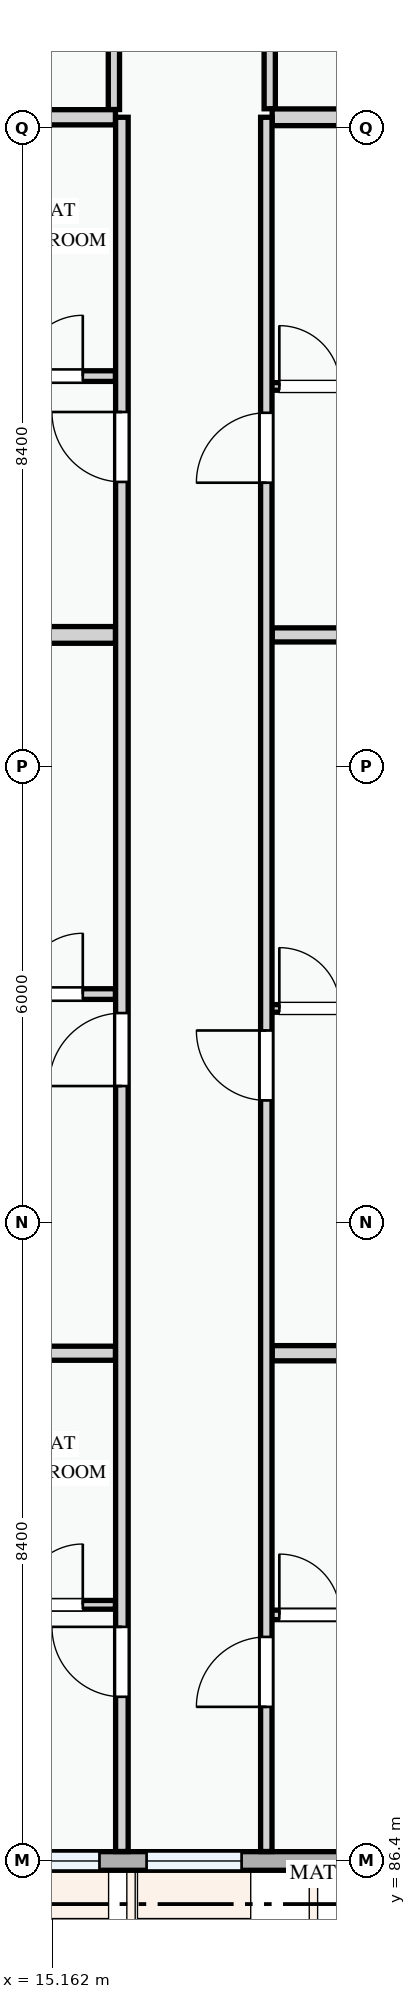
"""IFC4 building model, lengths in metres.
Left out: names, types, materials, properties, quantities, classifications, styles, units other than length and angle.
Written with IfcOpenShell. Run it as: python <this file> out.ifc"""

import sys

from ifc_helpers import new_model, si_unit, direction, frame, frame_2d, origin, place, context, subcontext, project, spatial, rectangle, extrude, element, fill, save


model = new_model("IFC4")
c1 = context("Model", 3, precision=1e-05, world=origin(), true_north=direction((0.0, 1.0)))
c2 = subcontext(c1, "Body", "Model", "MODEL_VIEW")
j1 = project(units=[si_unit("LENGTHUNIT", "METRE"), si_unit("PLANEANGLEUNIT", "RADIAN")], contexts=[c1])
p1 = place(None, origin())
s1 = spatial("IfcSite", under=j1, at=p1, CompositionType="ELEMENT")
p2 = place(p1, origin())
s2 = spatial("IfcBuilding", under=s1, at=p2, CompositionType="ELEMENT")
p3 = place(p2, frame((0.0, 0.0, 41.1)))
s3 = spatial("IfcBuildingStorey", under=s2, at=p3, CompositionType="ELEMENT", Elevation=41.1)
p4 = place(p3, frame((14.4, 86.4, 0.0), z_axis=(0.0, 0.0, 1.0), x_axis=(1.0, 0.0, 0.0)))
e1 = element("IfcWall", 1, at=p4, inside=s3, PredefinedType="STANDARD", context=c2, shape_type="SweptSolid", body=[
    extrude(rectangle(XDim=8.4, YDim=0.245, at=frame_2d((4.2, 0.0))), origin(), (0.0, 0.0, 1.0), 2.375),
])
p5 = place(p4, frame((0.485, 0.0, 0.78)))
e2 = element("IfcOpeningElement", 2, at=p5, cuts=e1, PredefinedType="OPENING", context=c2, shape_type="SweptSolid", body=[
    extrude(rectangle(XDim=0.9, YDim=1.2, at=frame_2d((0.45, 0.6))), frame((0.0, 0.133, 0.0), z_axis=(0.0, -1.0, 0.0), x_axis=(1.0, 0.0, 0.0)), (0.0, 0.0, 1.0), 0.265),
])
p6 = place(p4, frame((2.005, 0.0, 0.78)))
e3 = element("IfcOpeningElement", 3, at=p6, cuts=e1, PredefinedType="OPENING", context=c2, shape_type="SweptSolid", body=[
    extrude(rectangle(XDim=1.25, YDim=1.3, at=frame_2d((0.625, 0.65))), frame((0.0, 0.133, 0.0), z_axis=(0.0, -1.0, 0.0), x_axis=(1.0, 0.0, 0.0)), (0.0, 0.0, 1.0), 0.265),
])
p7 = place(p4, frame((4.985, 0.0, 0.78)))
e4 = element("IfcOpeningElement", 4, at=p7, cuts=e1, PredefinedType="OPENING", context=c2, shape_type="SweptSolid", body=[
    extrude(rectangle(XDim=1.82, YDim=1.46, at=frame_2d((0.91, 0.73))), frame((0.0, 0.133, 0.0), z_axis=(0.0, -1.0, 0.0), x_axis=(1.0, 0.0, 0.0)), (0.0, 0.0, 1.0), 0.265),
])
p8 = place(p3, frame((15.975, 113.324, 0.0), z_axis=(0.0, 0.0, 1.0), x_axis=(0.0, -1.0, 0.0)))
e5 = element("IfcWall", 5, at=p8, inside=s3, PredefinedType="PARTITIONING", context=c2, shape_type="SweptSolid", body=[
    extrude(rectangle(XDim=3.882, YDim=0.148, at=frame_2d((1.941, 0.0))), origin(), (0.0, 0.0, 1.0), 3.0),
])
p9 = place(p3, frame((18.025, 113.324, 0.0), z_axis=(0.0, 0.0, 1.0), x_axis=(0.0, -1.0, 0.0)))
e6 = element("IfcWall", 6, at=p9, inside=s3, PredefinedType="PARTITIONING", context=c2, shape_type="SweptSolid", body=[
    extrude(rectangle(XDim=3.872, YDim=0.148, at=frame_2d((1.936, 0.0))), origin(), (0.0, 0.0, 1.0), 3.0),
])
p10 = place(p3, frame((8.524, 89.77, 0.0), z_axis=(0.0, 0.0, 1.0), x_axis=(1.0, 0.0, 0.0)))
e7 = element("IfcWall", 7, at=p10, inside=s3, PredefinedType="PARTITIONING", context=c2, shape_type="SweptSolid", body=[
    extrude(rectangle(XDim=7.471, YDim=0.115, at=frame_2d((3.736, 0.0))), origin(), (0.0, 0.0, 1.0), 3.0),
])
p11 = place(p10, frame((1.339, 0.0, 0.0)))
e8 = element("IfcOpeningElement", 8, at=p11, cuts=e7, PredefinedType="OPENING", context=c2, shape_type="SweptSolid", body=[
    extrude(rectangle(XDim=0.85, YDim=2.1, at=frame_2d((0.425, 1.05))), frame((0.0, 0.067, 0.0), z_axis=(0.0, -1.0, 0.0), x_axis=(1.0, 0.0, 0.0)), (0.0, 0.0, 1.0), 0.135),
])
p12 = place(p10, frame((4.235, 0.0, 0.0)))
e9 = element("IfcOpeningElement", 9, at=p12, cuts=e7, PredefinedType="OPENING", context=c2, shape_type="SweptSolid", body=[
    extrude(rectangle(XDim=0.85, YDim=2.1, at=frame_2d((0.425, 1.05))), frame((0.0, 0.067, 0.0), z_axis=(0.0, -1.0, 0.0), x_axis=(1.0, 0.0, 0.0)), (0.0, 0.0, 1.0), 0.135),
])
p13 = place(p10, frame((6.241, 0.0, 0.0)))
e10 = element("IfcOpeningElement", 10, at=p13, cuts=e7, PredefinedType="OPENING", context=c2, shape_type="SweptSolid", body=[
    extrude(rectangle(XDim=0.8, YDim=2.1, at=frame_2d((0.4, 1.05))), frame((0.0, 0.067, 0.0), z_axis=(0.0, -1.0, 0.0), x_axis=(1.0, 0.0, 0.0)), (0.0, 0.0, 1.0), 0.135),
])
p14 = place(p3, frame((17.98, 89.638, 0.0), z_axis=(0.0, 0.0, 1.0), x_axis=(1.0, 0.0, 0.0)))
e11 = element("IfcWall", 11, at=p14, inside=s3, PredefinedType="PARTITIONING", context=c2, shape_type="SweptSolid", body=[
    extrude(rectangle(XDim=4.696, YDim=0.125, at=frame_2d((2.348, 0.0))), origin(), (0.0, 0.0, 1.0), 3.0),
])
p15 = place(p14, frame((0.171, 0.0, 0.0)))
e12 = element("IfcOpeningElement", 12, at=p15, cuts=e11, PredefinedType="OPENING", context=c2, shape_type="SweptSolid", body=[
    extrude(rectangle(XDim=0.8, YDim=2.1, at=frame_2d((0.4, 1.05))), frame((0.0, 0.073, 0.0), z_axis=(0.0, -1.0, 0.0), x_axis=(1.0, 0.0, 0.0)), (0.0, 0.0, 1.0), 0.145),
])
p16 = place(p14, frame((1.384, 0.0, 0.0)))
e13 = element("IfcOpeningElement", 13, at=p16, cuts=e11, PredefinedType="OPENING", context=c2, shape_type="SweptSolid", body=[
    extrude(rectangle(XDim=0.85, YDim=2.1, at=frame_2d((0.425, 1.05))), frame((0.0, 0.073, 0.0), z_axis=(0.0, -1.0, 0.0), x_axis=(1.0, 0.0, 0.0)), (0.0, 0.0, 1.0), 0.145),
])
p17 = place(p14, frame((3.193, 0.0, 0.0)))
e14 = element("IfcOpeningElement", 14, at=p17, cuts=e11, PredefinedType="OPENING", context=c2, shape_type="SweptSolid", body=[
    extrude(rectangle(XDim=0.85, YDim=2.1, at=frame_2d((0.425, 1.05))), frame((0.0, 0.073, 0.0), z_axis=(0.0, -1.0, 0.0), x_axis=(1.0, 0.0, 0.0)), (0.0, 0.0, 1.0), 0.145),
])
p18 = place(p3, frame((8.524, 97.805, 0.0), z_axis=(0.0, 0.0, 1.0), x_axis=(1.0, 0.0, 0.0)))
e15 = element("IfcWall", 15, at=p18, inside=s3, PredefinedType="PARTITIONING", context=c2, shape_type="SweptSolid", body=[
    extrude(rectangle(XDim=7.471, YDim=0.14, at=frame_2d((3.736, 0.0))), origin(), (0.0, 0.0, 1.0), 3.0),
])
p19 = place(p18, frame((1.339, 0.0, 0.0)))
e16 = element("IfcOpeningElement", 16, at=p19, cuts=e15, PredefinedType="OPENING", context=c2, shape_type="SweptSolid", body=[
    extrude(rectangle(XDim=0.85, YDim=2.1, at=frame_2d((0.425, 1.05))), frame((0.0, 0.08, 0.0), z_axis=(0.0, -1.0, 0.0), x_axis=(1.0, 0.0, 0.0)), (0.0, 0.0, 1.0), 0.16),
])
p20 = place(p18, frame((4.235, 0.0, 0.0)))
e17 = element("IfcOpeningElement", 17, at=p20, cuts=e15, PredefinedType="OPENING", context=c2, shape_type="SweptSolid", body=[
    extrude(rectangle(XDim=0.82, YDim=2.08, at=frame_2d((0.41, 1.04))), frame((0.0, 0.08, 0.0), z_axis=(0.0, -1.0, 0.0), x_axis=(1.0, 0.0, 0.0)), (0.0, 0.0, 1.0), 0.16),
])
p21 = place(p18, frame((6.241, 0.0, 0.0)))
e18 = element("IfcOpeningElement", 18, at=p21, cuts=e15, PredefinedType="OPENING", context=c2, shape_type="SweptSolid", body=[
    extrude(rectangle(XDim=0.8, YDim=2.1, at=frame_2d((0.4, 1.05))), frame((0.0, 0.08, 0.0), z_axis=(0.0, -1.0, 0.0), x_axis=(1.0, 0.0, 0.0)), (0.0, 0.0, 1.0), 0.16),
])
p22 = place(p3, frame((17.98, 97.616, 0.0), z_axis=(0.0, 0.0, 1.0), x_axis=(1.0, 0.0, 0.0)))
e19 = element("IfcWall", 19, at=p22, inside=s3, PredefinedType="PARTITIONING", context=c2, shape_type="SweptSolid", body=[
    extrude(rectangle(XDim=4.696, YDim=0.1, at=frame_2d((2.348, 0.0))), origin(), (0.0, 0.0, 1.0), 3.0),
])
p23 = place(p22, frame((0.171, 0.0, 0.0)))
e20 = element("IfcOpeningElement", 20, at=p23, cuts=e19, PredefinedType="OPENING", context=c2, shape_type="SweptSolid", body=[
    extrude(rectangle(XDim=0.8, YDim=2.1, at=frame_2d((0.4, 1.05))), frame((0.0, 0.06, 0.0), z_axis=(0.0, -1.0, 0.0), x_axis=(1.0, 0.0, 0.0)), (0.0, 0.0, 1.0), 0.12),
])
p24 = place(p22, frame((1.384, 0.0, 0.0)))
e21 = element("IfcOpeningElement", 21, at=p24, cuts=e19, PredefinedType="OPENING", context=c2, shape_type="SweptSolid", body=[
    extrude(rectangle(XDim=0.85, YDim=2.1, at=frame_2d((0.425, 1.05))), frame((0.0, 0.06, 0.0), z_axis=(0.0, -1.0, 0.0), x_axis=(1.0, 0.0, 0.0)), (0.0, 0.0, 1.0), 0.12),
])
p25 = place(p22, frame((3.193, 0.0, 0.0)))
e22 = element("IfcOpeningElement", 22, at=p25, cuts=e19, PredefinedType="OPENING", context=c2, shape_type="SweptSolid", body=[
    extrude(rectangle(XDim=0.82, YDim=2.08, at=frame_2d((0.41, 1.04))), frame((0.0, 0.06, 0.0), z_axis=(0.0, -1.0, 0.0), x_axis=(1.0, 0.0, 0.0)), (0.0, 0.0, 1.0), 0.12),
])
p26 = place(p3, frame((8.524, 93.08, 0.0), z_axis=(0.0, 0.0, 1.0), x_axis=(1.0, 0.0, 0.0)))
e23 = element("IfcWall", 23, at=p26, inside=s3, PredefinedType="PARTITIONING", context=c2, shape_type="SweptSolid", body=[
    extrude(rectangle(XDim=7.471, YDim=0.185, at=frame_2d((3.736, 0.0))), origin(), (0.0, 0.0, 1.0), 3.0),
])
p27 = place(p3, frame((18.057, 93.08, 0.0), z_axis=(0.0, 0.0, 1.0), x_axis=(1.0, 0.0, 0.0)))
e24 = element("IfcWall", 24, at=p27, inside=s3, PredefinedType="PARTITIONING", context=c2, shape_type="SweptSolid", body=[
    extrude(rectangle(XDim=4.619, YDim=0.2, at=frame_2d((2.309, 0.0))), origin(), (0.0, 0.0, 1.0), 3.0),
])
p28 = place(p3, frame((8.524, 105.935, 0.0), z_axis=(0.0, 0.0, 1.0), x_axis=(1.0, 0.0, 0.0)))
e25 = element("IfcWall", 25, at=p28, inside=s3, PredefinedType="PARTITIONING", context=c2, shape_type="SweptSolid", body=[
    extrude(rectangle(XDim=7.471, YDim=0.14, at=frame_2d((3.736, 0.0))), origin(), (0.0, 0.0, 1.0), 3.0),
])
p29 = place(p28, frame((1.339, 0.0, 0.0)))
e26 = element("IfcOpeningElement", 26, at=p29, cuts=e25, PredefinedType="OPENING", context=c2, shape_type="SweptSolid", body=[
    extrude(rectangle(XDim=0.85, YDim=2.1, at=frame_2d((0.425, 1.05))), frame((0.0, 0.08, 0.0), z_axis=(0.0, -1.0, 0.0), x_axis=(1.0, 0.0, 0.0)), (0.0, 0.0, 1.0), 0.16),
])
p30 = place(p28, frame((4.235, 0.0, 0.0)))
e27 = element("IfcOpeningElement", 27, at=p30, cuts=e25, PredefinedType="OPENING", context=c2, shape_type="SweptSolid", body=[
    extrude(rectangle(XDim=0.85, YDim=2.1, at=frame_2d((0.425, 1.05))), frame((0.0, 0.08, 0.0), z_axis=(0.0, -1.0, 0.0), x_axis=(1.0, 0.0, 0.0)), (0.0, 0.0, 1.0), 0.16),
])
p31 = place(p28, frame((6.241, 0.0, 0.0)))
e28 = element("IfcOpeningElement", 28, at=p31, cuts=e25, PredefinedType="OPENING", context=c2, shape_type="SweptSolid", body=[
    extrude(rectangle(XDim=0.8, YDim=2.1, at=frame_2d((0.4, 1.05))), frame((0.0, 0.08, 0.0), z_axis=(0.0, -1.0, 0.0), x_axis=(1.0, 0.0, 0.0)), (0.0, 0.0, 1.0), 0.16),
])
p32 = place(p3, frame((17.98, 105.799, 0.0), z_axis=(0.0, 0.0, 1.0), x_axis=(1.0, 0.0, 0.0)))
e29 = element("IfcWall", 29, at=p32, inside=s3, PredefinedType="PARTITIONING", context=c2, shape_type="SweptSolid", body=[
    extrude(rectangle(XDim=4.696, YDim=0.1, at=frame_2d((2.348, 0.0))), origin(), (0.0, 0.0, 1.0), 3.0),
])
p33 = place(p32, frame((0.171, 0.0, 0.0)))
e30 = element("IfcOpeningElement", 30, at=p33, cuts=e29, PredefinedType="OPENING", context=c2, shape_type="SweptSolid", body=[
    extrude(rectangle(XDim=0.8, YDim=2.1, at=frame_2d((0.4, 1.05))), frame((0.0, 0.06, 0.0), z_axis=(0.0, -1.0, 0.0), x_axis=(1.0, 0.0, 0.0)), (0.0, 0.0, 1.0), 0.12),
])
p34 = place(p32, frame((1.384, 0.0, 0.0)))
e31 = element("IfcOpeningElement", 31, at=p34, cuts=e29, PredefinedType="OPENING", context=c2, shape_type="SweptSolid", body=[
    extrude(rectangle(XDim=0.85, YDim=2.1, at=frame_2d((0.425, 1.05))), frame((0.0, 0.06, 0.0), z_axis=(0.0, -1.0, 0.0), x_axis=(1.0, 0.0, 0.0)), (0.0, 0.0, 1.0), 0.12),
])
p35 = place(p32, frame((3.193, 0.0, 0.0)))
e32 = element("IfcOpeningElement", 32, at=p35, cuts=e29, PredefinedType="OPENING", context=c2, shape_type="SweptSolid", body=[
    extrude(rectangle(XDim=0.85, YDim=2.1, at=frame_2d((0.425, 1.05))), frame((0.0, 0.06, 0.0), z_axis=(0.0, -1.0, 0.0), x_axis=(1.0, 0.0, 0.0)), (0.0, 0.0, 1.0), 0.12),
])
p36 = place(p3, frame((8.524, 102.53, 0.0), z_axis=(0.0, 0.0, 1.0), x_axis=(1.0, 0.0, 0.0)))
e33 = element("IfcWall", 33, at=p36, inside=s3, PredefinedType="PARTITIONING", context=c2, shape_type="SweptSolid", body=[
    extrude(rectangle(XDim=7.471, YDim=0.22, at=frame_2d((3.736, 0.0))), origin(), (0.0, 0.0, 1.0), 3.0),
])
p37 = place(p3, frame((18.057, 102.53, 0.0), z_axis=(0.0, 0.0, 1.0), x_axis=(1.0, 0.0, 0.0)))
e34 = element("IfcWall", 34, at=p37, inside=s3, PredefinedType="PARTITIONING", context=c2, shape_type="SweptSolid", body=[
    extrude(rectangle(XDim=4.619, YDim=0.185, at=frame_2d((2.309, 0.0))), origin(), (0.0, 0.0, 1.0), 3.0),
])
p38 = place(p3, frame((8.524, 109.34, 0.0), z_axis=(0.0, 0.0, 1.0), x_axis=(1.0, 0.0, 0.0)))
e35 = element("IfcWall", 35, at=p38, inside=s3, PredefinedType="PARTITIONING", context=c2, shape_type="SweptSolid", body=[
    extrude(rectangle(XDim=7.471, YDim=0.2, at=frame_2d((3.736, 0.0))), origin(), (0.0, 0.0, 1.0), 2.375),
])
p39 = place(p3, frame((18.057, 109.34, 0.0), z_axis=(0.0, 0.0, 1.0), x_axis=(1.0, 0.0, 0.0)))
e36 = element("IfcWall", 36, at=p39, inside=s3, PredefinedType="PARTITIONING", context=c2, shape_type="SweptSolid", body=[
    extrude(rectangle(XDim=4.683, YDim=0.22, at=frame_2d((2.342, 0.0))), origin(), (0.0, 0.0, 1.0), 2.375),
])
p40 = place(p3, frame((16.08, 86.524, 0.0), z_axis=(0.0, 0.0, 1.0), x_axis=(0.0, 1.0, 0.0)))
e37 = element("IfcWall", 37, at=p40, inside=s3, PredefinedType="PARTITIONING", context=c2, shape_type="SweptSolid", body=[
    extrude(rectangle(XDim=22.816, YDim=0.165, at=frame_2d((11.408, 0.0))), origin(), (0.0, 0.0, 1.0), 3.0),
])
p41 = place(p40, frame((2.035, 0.0, 0.0)))
e38 = element("IfcOpeningElement", 38, at=p41, cuts=e37, PredefinedType="OPENING", context=c2, shape_type="SweptSolid", body=[
    extrude(rectangle(XDim=0.92, YDim=2.1, at=frame_2d((0.46, 1.05))), frame((0.0, 0.093, 0.0), z_axis=(0.0, -1.0, 0.0), x_axis=(1.0, 0.0, 0.0)), (0.0, 0.0, 1.0), 0.185),
])
p42 = place(p40, frame((10.071, 0.0, 0.0)))
e39 = element("IfcOpeningElement", 39, at=p42, cuts=e37, PredefinedType="OPENING", context=c2, shape_type="SweptSolid", body=[
    extrude(rectangle(XDim=0.96, YDim=2.12, at=frame_2d((0.48, 1.06))), frame((0.0, 0.093, 0.0), z_axis=(0.0, -1.0, 0.0), x_axis=(1.0, 0.0, 0.0)), (0.0, 0.0, 1.0), 0.185),
])
p43 = place(p40, frame((18.018, 0.0, 0.0)))
e40 = element("IfcOpeningElement", 40, at=p43, cuts=e37, PredefinedType="OPENING", context=c2, shape_type="SweptSolid", body=[
    extrude(rectangle(XDim=0.92, YDim=2.1, at=frame_2d((0.46, 1.05))), frame((0.0, 0.093, 0.0), z_axis=(0.0, -1.0, 0.0), x_axis=(1.0, 0.0, 0.0)), (0.0, 0.0, 1.0), 0.185),
])
p44 = place(p3, frame((17.98, 86.524, 0.0), z_axis=(0.0, 0.0, 1.0), x_axis=(0.0, 1.0, 0.0)))
e41 = element("IfcWall", 41, at=p44, inside=s3, PredefinedType="PARTITIONING", context=c2, shape_type="SweptSolid", body=[
    extrude(rectangle(XDim=22.816, YDim=0.15, at=frame_2d((11.408, 0.0))), origin(), (0.0, 0.0, 1.0), 3.0),
])
p45 = place(p44, frame((1.903, 0.0, 0.0)))
e42 = element("IfcOpeningElement", 42, at=p45, cuts=e41, PredefinedType="OPENING", context=c2, shape_type="SweptSolid", body=[
    extrude(rectangle(XDim=0.92, YDim=2.1, at=frame_2d((0.46, 1.05))), frame((0.0, 0.085, 0.0), z_axis=(0.0, -1.0, 0.0), x_axis=(1.0, 0.0, 0.0)), (0.0, 0.0, 1.0), 0.17),
])
p46 = place(p44, frame((9.882, 0.0, 0.0)))
e43 = element("IfcOpeningElement", 43, at=p46, cuts=e41, PredefinedType="OPENING", context=c2, shape_type="SweptSolid", body=[
    extrude(rectangle(XDim=0.92, YDim=2.1, at=frame_2d((0.46, 1.05))), frame((0.0, 0.085, 0.0), z_axis=(0.0, -1.0, 0.0), x_axis=(1.0, 0.0, 0.0)), (0.0, 0.0, 1.0), 0.17),
])
p47 = place(p44, frame((18.008, 0.0, 0.0)))
e44 = element("IfcOpeningElement", 44, at=p47, cuts=e41, PredefinedType="OPENING", context=c2, shape_type="SweptSolid", body=[
    extrude(rectangle(XDim=0.92, YDim=2.1, at=frame_2d((0.46, 1.05))), frame((0.0, 0.085, 0.0), z_axis=(0.0, -1.0, 0.0), x_axis=(1.0, 0.0, 0.0)), (0.0, 0.0, 1.0), 0.17),
])
p48 = place(p5, origin())
e45 = element("IfcWindow", 45, at=p48, inside=s3, PartitioningType="SINGLE_PANEL", PredefinedType="WINDOW", context=c2, shape_type="SweptSolid", body=[
    extrude(rectangle(XDim=0.9, YDim=1.2, at=frame_2d((0.45, 0.6))), frame((0.0, 0.03, 0.0), z_axis=(0.0, -1.0, 0.0), x_axis=(1.0, 0.0, 0.0)), (0.0, 0.0, 1.0), 0.06),
])
fill(e2, e45)
p49 = place(p6, origin())
e46 = element("IfcWindow", 46, at=p49, inside=s3, PartitioningType="SINGLE_PANEL", PredefinedType="WINDOW", context=c2, shape_type="SweptSolid", body=[
    extrude(rectangle(XDim=1.25, YDim=1.3, at=frame_2d((0.625, 0.65))), frame((0.0, 0.03, 0.0), z_axis=(0.0, -1.0, 0.0), x_axis=(1.0, 0.0, 0.0)), (0.0, 0.0, 1.0), 0.06),
])
fill(e3, e46)
p50 = place(p13, origin())
e47 = element("IfcDoor", 47, at=p50, inside=s3, OperationType="SINGLE_SWING_RIGHT", PredefinedType="DOOR", context=c2, shape_type="SweptSolid", body=[
    extrude(rectangle(XDim=0.8, YDim=2.1, at=frame_2d((0.4, 1.05))), frame((0.0, 0.025, 0.0), z_axis=(0.0, -1.0, 0.0), x_axis=(1.0, 0.0, 0.0)), (0.0, 0.0, 1.0), 0.05),
])
fill(e10, e47)
p51 = place(p15, origin())
e48 = element("IfcDoor", 48, at=p51, inside=s3, OperationType="SINGLE_SWING_LEFT", PredefinedType="DOOR", context=c2, shape_type="SweptSolid", body=[
    extrude(rectangle(XDim=0.8, YDim=2.1, at=frame_2d((0.4, 1.05))), frame((0.0, 0.025, 0.0), z_axis=(0.0, -1.0, 0.0), x_axis=(1.0, 0.0, 0.0)), (0.0, 0.0, 1.0), 0.05),
])
fill(e12, e48)
p52 = place(p21, origin())
e49 = element("IfcDoor", 49, at=p52, inside=s3, OperationType="SINGLE_SWING_RIGHT", PredefinedType="DOOR", context=c2, shape_type="SweptSolid", body=[
    extrude(rectangle(XDim=0.8, YDim=2.1, at=frame_2d((0.4, 1.05))), frame((0.0, 0.025, 0.0), z_axis=(0.0, -1.0, 0.0), x_axis=(1.0, 0.0, 0.0)), (0.0, 0.0, 1.0), 0.05),
])
fill(e18, e49)
p53 = place(p23, origin())
e50 = element("IfcDoor", 50, at=p53, inside=s3, OperationType="SINGLE_SWING_LEFT", PredefinedType="DOOR", context=c2, shape_type="SweptSolid", body=[
    extrude(rectangle(XDim=0.8, YDim=2.1, at=frame_2d((0.4, 1.05))), frame((0.0, 0.025, 0.0), z_axis=(0.0, -1.0, 0.0), x_axis=(1.0, 0.0, 0.0)), (0.0, 0.0, 1.0), 0.05),
])
fill(e20, e50)
p54 = place(p31, origin())
e51 = element("IfcDoor", 51, at=p54, inside=s3, OperationType="SINGLE_SWING_RIGHT", PredefinedType="DOOR", context=c2, shape_type="SweptSolid", body=[
    extrude(rectangle(XDim=0.8, YDim=2.1, at=frame_2d((0.4, 1.05))), frame((0.0, 0.025, 0.0), z_axis=(0.0, -1.0, 0.0), x_axis=(1.0, 0.0, 0.0)), (0.0, 0.0, 1.0), 0.05),
])
fill(e28, e51)
p55 = place(p33, origin())
e52 = element("IfcDoor", 52, at=p55, inside=s3, OperationType="SINGLE_SWING_LEFT", PredefinedType="DOOR", context=c2, shape_type="SweptSolid", body=[
    extrude(rectangle(XDim=0.8, YDim=2.1, at=frame_2d((0.4, 1.05))), frame((0.0, 0.025, 0.0), z_axis=(0.0, -1.0, 0.0), x_axis=(1.0, 0.0, 0.0)), (0.0, 0.0, 1.0), 0.05),
])
fill(e30, e52)
p56 = place(p41, origin())
e53 = element("IfcDoor", 53, at=p56, inside=s3, OperationType="SINGLE_SWING_RIGHT", PredefinedType="DOOR", context=c2, shape_type="SweptSolid", body=[
    extrude(rectangle(XDim=0.92, YDim=2.1, at=frame_2d((0.46, 1.05))), frame((0.0, 0.025, 0.0), z_axis=(0.0, -1.0, 0.0), x_axis=(1.0, 0.0, 0.0)), (0.0, 0.0, 1.0), 0.05),
])
fill(e38, e53)
p57 = place(p42, origin())
e54 = element("IfcDoor", 54, at=p57, inside=s3, OperationType="SINGLE_SWING_LEFT", PredefinedType="DOOR", context=c2, shape_type="SweptSolid", body=[
    extrude(rectangle(XDim=0.96, YDim=2.12, at=frame_2d((0.48, 1.06))), frame((0.0, 0.025, 0.0), z_axis=(0.0, -1.0, 0.0), x_axis=(1.0, 0.0, 0.0)), (0.0, 0.0, 1.0), 0.05),
])
fill(e39, e54)
p58 = place(p43, origin())
e55 = element("IfcDoor", 55, at=p58, inside=s3, OperationType="SINGLE_SWING_RIGHT", PredefinedType="DOOR", context=c2, shape_type="SweptSolid", body=[
    extrude(rectangle(XDim=0.92, YDim=2.1, at=frame_2d((0.46, 1.05))), frame((0.0, 0.025, 0.0), z_axis=(0.0, -1.0, 0.0), x_axis=(1.0, 0.0, 0.0)), (0.0, 0.0, 1.0), 0.05),
])
fill(e40, e55)
p59 = place(p45, origin())
e56 = element("IfcDoor", 56, at=p59, inside=s3, OperationType="SINGLE_SWING_LEFT", PredefinedType="DOOR", context=c2, shape_type="SweptSolid", body=[
    extrude(rectangle(XDim=0.92, YDim=2.1, at=frame_2d((0.46, 1.05))), frame((0.0, 0.025, 0.0), z_axis=(0.0, -1.0, 0.0), x_axis=(1.0, 0.0, 0.0)), (0.0, 0.0, 1.0), 0.05),
])
fill(e42, e56)
p60 = place(p46, origin())
e57 = element("IfcDoor", 57, at=p60, inside=s3, OperationType="SINGLE_SWING_RIGHT", PredefinedType="DOOR", context=c2, shape_type="SweptSolid", body=[
    extrude(rectangle(XDim=0.92, YDim=2.1, at=frame_2d((0.46, 1.05))), frame((0.0, 0.025, 0.0), z_axis=(0.0, -1.0, 0.0), x_axis=(1.0, 0.0, 0.0)), (0.0, 0.0, 1.0), 0.05),
])
fill(e43, e57)
p61 = place(p47, origin())
e58 = element("IfcDoor", 58, at=p61, inside=s3, OperationType="SINGLE_SWING_LEFT", PredefinedType="DOOR", context=c2, shape_type="SweptSolid", body=[
    extrude(rectangle(XDim=0.92, YDim=2.1, at=frame_2d((0.46, 1.05))), frame((0.0, 0.025, 0.0), z_axis=(0.0, -1.0, 0.0), x_axis=(1.0, 0.0, 0.0)), (0.0, 0.0, 1.0), 0.05),
])
fill(e44, e58)
save(model, sys.argv[1])
